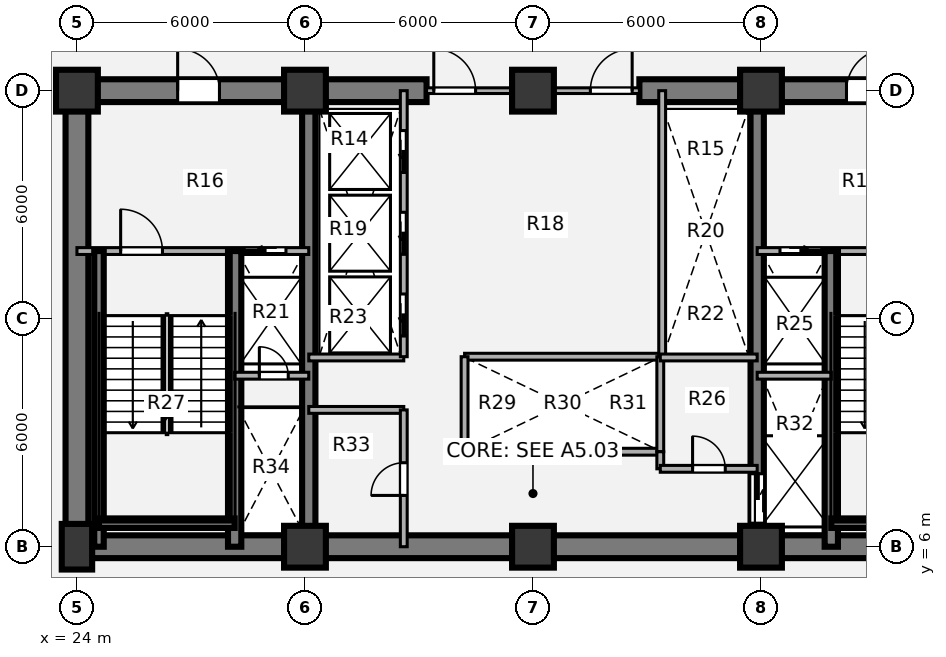
"""IFC4 building model, lengths in metres.
Left out: names, types, materials, properties, quantities, classifications, styles, units other than length and angle.
Written with IfcOpenShell. Run it as: python <this file> out.ifc"""

import sys

from ifc_helpers import new_model, si_unit, direction, frame, frame_2d, origin, origin_2d, place, context, subcontext, project, spatial, rectangle, extrude, source, transform, mapped, element, fill, save


model = new_model("IFC4")
c1 = context("Model", 3, precision=1e-05, world=origin(), true_north=direction((0.0, 1.0)))
c2 = subcontext(c1, "Body", "Model", "MODEL_VIEW")
j1 = project(units=[si_unit("LENGTHUNIT", "METRE"), si_unit("PLANEANGLEUNIT", "RADIAN")], contexts=[c1])
p1 = place(None, origin())
s1 = spatial("IfcSite", under=j1, at=p1, CompositionType="ELEMENT")
p2 = place(p1, origin())
s2 = spatial("IfcBuilding", under=s1, at=p2, CompositionType="ELEMENT")
p3 = place(p2, frame((0.0, 0.0, 9.72)))
s3 = spatial("IfcBuildingStorey", under=s2, at=p3, CompositionType="ELEMENT", Elevation=9.72)
m1 = source(origin(), c2, "Body", "SweptSolid", [
    extrude(rectangle(XDim=0.8, YDim=1.2, at=origin_2d()), origin(), (0.0, 0.0, 1.0), 4.32),
])
p4 = place(p3, frame((24.0, 6.0, 0.0), z_axis=(0.0, 0.0, 1.0), x_axis=(1.0, 0.0, 0.0)))
e1 = element("IfcColumn", 1, at=p4, inside=s3, PredefinedType="COLUMN", context=c2, shape_type="MappedRepresentation", body=[
    mapped(m1, transform((0.0, 0.0, 0.0), x_axis=(1.0, 0.0, 0.0), y_axis=(0.0, 1.0, 0.0), z_axis=(0.0, 0.0, 1.0), scale=1.0)),
])
m2 = source(origin(), c2, "Body", "SweptSolid", [
    extrude(rectangle(XDim=1.1, YDim=1.1, at=origin_2d()), origin(), (0.0, 0.0, 1.0), 4.32),
])
for number, where, z_axis, x_axis in (
    (2, (30.0, 6.0, 0.0), (0.0, 0.0, 1.0), (1.0, 0.0, 0.0)),
    (3, (36.0, 6.0, 0.0), (0.0, 0.0, 1.0), (1.0, 0.0, 0.0)),
    (4, (42.0, 6.0, 0.0), (0.0, 0.0, 1.0), (1.0, 0.0, 0.0)),
    (5, (24.0, 18.0, 0.0), (0.0, 0.0, 1.0), (1.0, 0.0, 0.0)),
    (6, (30.0, 18.0, 0.0), (0.0, 0.0, 1.0), (1.0, 0.0, 0.0)),
    (7, (36.0, 18.0, 0.0), (0.0, 0.0, 1.0), (1.0, 0.0, 0.0)),
    (8, (42.0, 18.0, 0.0), (0.0, 0.0, 1.0), (1.0, 0.0, 0.0)),
):
    element("IfcColumn", number, at=place(p3, frame(where, z_axis=z_axis, x_axis=x_axis)), inside=s3, PredefinedType="COLUMN", context=c2, shape_type="MappedRepresentation", body=[
        mapped(m2, transform((0.0, 0.0, 0.0), x_axis=(1.0, 0.0, 0.0), y_axis=(0.0, 1.0, 0.0), z_axis=(0.0, 0.0, 1.0), scale=1.0)),
    ])
p5 = place(p3, frame((48.3, 6.0, 0.0), z_axis=(0.0, 0.0, 1.0), x_axis=(-1.0, 0.0, 0.0)))
e9 = element("IfcWall", 9, at=p5, inside=s3, PredefinedType="SHEAR", context=c2, shape_type="SweptSolid", body=[
    extrude(rectangle(XDim=24.6, YDim=0.6, at=frame_2d((12.3, 0.0))), origin(), (0.0, 0.0, 1.0), 4.32),
])
p6 = place(p3, frame((24.0, 6.0, 0.0), z_axis=(0.0, 0.0, 1.0), x_axis=(0.0, 1.0, 0.0)))
e10 = element("IfcWall", 10, at=p6, inside=s3, PredefinedType="SHEAR", context=c2, shape_type="SweptSolid", body=[
    extrude(rectangle(XDim=12.0, YDim=0.6, at=frame_2d((6.0, 0.0))), origin(), (0.0, 0.0, 1.0), 4.32),
])
p7 = place(p3, frame((23.7, 18.0, 0.0), z_axis=(0.0, 0.0, 1.0), x_axis=(1.0, 0.0, 0.0)))
e11 = element("IfcWall", 11, at=p7, inside=s3, PredefinedType="SHEAR", context=c2, shape_type="SweptSolid", body=[
    extrude(rectangle(XDim=9.5, YDim=0.6, at=frame_2d((4.75, 0.0))), origin(), (0.0, 0.0, 1.0), 4.32),
])
p8 = place(p7, frame((2.95, 0.0, 0.0)))
e12 = element("IfcOpeningElement", 12, at=p8, cuts=e11, PredefinedType="OPENING", context=c2, shape_type="SweptSolid", body=[
    extrude(rectangle(XDim=1.1, YDim=2.1, at=origin_2d()), frame((0.55, 0.31, 1.05), z_axis=(0.0, -1.0, 0.0), x_axis=(1.0, 0.0, 0.0)), (0.0, 0.0, 1.0), 0.62),
])
p9 = place(p3, frame((38.8, 18.0, 0.0), z_axis=(0.0, 0.0, 1.0), x_axis=(1.0, 0.0, 0.0)))
e13 = element("IfcWall", 13, at=p9, inside=s3, PredefinedType="SHEAR", context=c2, shape_type="SweptSolid", body=[
    extrude(rectangle(XDim=9.5, YDim=0.6, at=frame_2d((4.75, 0.0))), origin(), (0.0, 0.0, 1.0), 4.32),
])
p10 = place(p9, frame((5.45, 0.0, 0.0)))
e14 = element("IfcOpeningElement", 14, at=p10, cuts=e13, PredefinedType="OPENING", context=c2, shape_type="SweptSolid", body=[
    extrude(rectangle(XDim=1.1, YDim=2.1, at=origin_2d()), frame((0.55, 0.31, 1.05), z_axis=(0.0, -1.0, 0.0), x_axis=(1.0, 0.0, 0.0)), (0.0, 0.0, 1.0), 0.62),
])
p11 = place(p3, frame((30.1, 6.0, 0.0), z_axis=(0.0, 0.0, 1.0), x_axis=(0.0, 1.0, 0.0)))
e15 = element("IfcWall", 15, at=p11, inside=s3, PredefinedType="SHEAR", context=c2, shape_type="SweptSolid", body=[
    extrude(rectangle(XDim=12.0, YDim=0.35, at=frame_2d((6.0, 0.0))), origin(), (0.0, 0.0, 1.0), 4.32),
])
p12 = place(p3, frame((41.9, 18.0, 0.0), z_axis=(0.0, 0.0, 1.0), x_axis=(0.0, -1.0, 0.0)))
e16 = element("IfcWall", 16, at=p12, inside=s3, PredefinedType="SHEAR", context=c2, shape_type="SweptSolid", body=[
    extrude(rectangle(XDim=12.0, YDim=0.35, at=frame_2d((6.0, 0.0))), origin(), (0.0, 0.0, 1.0), 4.32),
])
p13 = place(p12, frame((10.08, 0.0, 0.0)))
e17 = element("IfcOpeningElement", 17, at=p13, cuts=e16, PredefinedType="OPENING", context=c2, shape_type="SweptSolid", body=[
    extrude(rectangle(XDim=1.3, YDim=2.1, at=origin_2d()), frame((0.65, 0.185, 1.05), z_axis=(0.0, -1.0, 0.0), x_axis=(1.0, 0.0, 0.0)), (0.0, 0.0, 1.0), 0.37),
])
for number, where, z_axis, x_axis in (
    (18, (34.2, 11.0, 0.0), (0.0, 0.0, 1.0), (1.0, 0.0, 0.0)),
    (19, (34.2, 8.5, 0.0), (0.0, 0.0, 1.0), (1.0, 0.0, 0.0)),
):
    element("IfcWall", number, at=place(p3, frame(where, z_axis=z_axis, x_axis=x_axis)), inside=s3, PredefinedType="PARTITIONING", context=c2, shape_type="SweptSolid", body=[
        extrude(rectangle(XDim=5.15, YDim=0.18, at=frame_2d((2.575, 0.0))), origin(), (0.0, 0.0, 1.0), 4.01),
    ])
for number, where, z_axis, x_axis in (
    (20, (34.2, 8.5, 0.0), (0.0, 0.0, 1.0), (0.0, 1.0, 0.0)),
    (21, (39.35, 8.5, 0.0), (0.0, 0.0, 1.0), (0.0, 1.0, 0.0)),
):
    element("IfcWall", number, at=place(p3, frame(where, z_axis=z_axis, x_axis=x_axis)), inside=s3, PredefinedType="PARTITIONING", context=c2, shape_type="SweptSolid", body=[
        extrude(rectangle(XDim=2.5, YDim=0.18, at=frame_2d((1.25, 0.0))), origin(), (0.0, 0.0, 1.0), 4.01),
    ])
p14 = place(p3, frame((39.4, 11.0, 0.0), z_axis=(0.0, 0.0, 1.0), x_axis=(0.0, 1.0, 0.0)))
e22 = element("IfcWall", 22, at=p14, inside=s3, PredefinedType="PARTITIONING", context=c2, shape_type="SweptSolid", body=[
    extrude(rectangle(XDim=7.0, YDim=0.18, at=frame_2d((3.5, 0.0))), origin(), (0.0, 0.0, 1.0), 4.01),
])
for number, where, z_axis, x_axis in (
    (23, (30.1, 10.98, 0.0), (0.0, 0.0, 1.0), (1.0, 0.0, 0.0)),
    (24, (30.1, 9.6, 0.0), (0.0, 0.0, 1.0), (1.0, 0.0, 0.0)),
):
    element("IfcWall", number, at=place(p3, frame(where, z_axis=z_axis, x_axis=x_axis)), inside=s3, PredefinedType="PARTITIONING", context=c2, shape_type="SweptSolid", body=[
        extrude(rectangle(XDim=2.5, YDim=0.18, at=frame_2d((1.25, 0.0))), origin(), (0.0, 0.0, 1.0), 4.01),
    ])
p15 = place(p3, frame((32.6, 6.0, 0.0), z_axis=(0.0, 0.0, 1.0), x_axis=(0.0, 1.0, 0.0)))
e25 = element("IfcWall", 25, at=p15, inside=s3, PredefinedType="PARTITIONING", context=c2, shape_type="SweptSolid", body=[
    extrude(rectangle(XDim=3.6, YDim=0.18, at=frame_2d((1.8, 0.0))), origin(), (0.0, 0.0, 1.0), 4.01),
])
p16 = place(p15, frame((1.35, 0.0, 0.0)))
e26 = element("IfcOpeningElement", 26, at=p16, cuts=e25, PredefinedType="OPENING", context=c2, shape_type="SweptSolid", body=[
    extrude(rectangle(XDim=0.86, YDim=2.1, at=origin_2d()), frame((0.43, 0.1, 1.05), z_axis=(0.0, -1.0, 0.0), x_axis=(1.0, 0.0, 0.0)), (0.0, 0.0, 1.0), 0.2),
])
p17 = place(p3, frame((39.35, 10.98, 0.0), z_axis=(0.0, 0.0, 1.0), x_axis=(1.0, 0.0, 0.0)))
e27 = element("IfcWall", 27, at=p17, inside=s3, PredefinedType="PARTITIONING", context=c2, shape_type="SweptSolid", body=[
    extrude(rectangle(XDim=2.55, YDim=0.18, at=frame_2d((1.275, 0.0))), origin(), (0.0, 0.0, 1.0), 4.01),
])
p18 = place(p3, frame((39.35, 8.05, 0.0), z_axis=(0.0, 0.0, 1.0), x_axis=(0.0, 1.0, 0.0)))
e28 = element("IfcWall", 28, at=p18, inside=s3, PredefinedType="PARTITIONING", context=c2, shape_type="SweptSolid", body=[
    extrude(rectangle(XDim=0.45, YDim=0.18, at=frame_2d((0.225, 0.0))), origin(), (0.0, 0.0, 1.0), 4.01),
])
p19 = place(p3, frame((39.35, 8.05, 0.0), z_axis=(0.0, 0.0, 1.0), x_axis=(1.0, 0.0, 0.0)))
e29 = element("IfcWall", 29, at=p19, inside=s3, PredefinedType="PARTITIONING", context=c2, shape_type="SweptSolid", body=[
    extrude(rectangle(XDim=2.55, YDim=0.18, at=frame_2d((1.275, 0.0))), origin(), (0.0, 0.0, 1.0), 4.01),
])
p20 = place(p19, frame((0.85, 0.0, 0.0)))
e30 = element("IfcOpeningElement", 30, at=p20, cuts=e29, PredefinedType="OPENING", context=c2, shape_type="SweptSolid", body=[
    extrude(rectangle(XDim=0.86, YDim=2.1, at=origin_2d()), frame((0.43, 0.1, 1.05), z_axis=(0.0, -1.0, 0.0), x_axis=(1.0, 0.0, 0.0)), (0.0, 0.0, 1.0), 0.2),
])
p21 = place(p3, frame((33.2, 18.0, 0.0), z_axis=(0.0, 0.0, 1.0), x_axis=(1.0, 0.0, 0.0)))
e31 = element("IfcWall", 31, at=p21, inside=s3, PredefinedType="PARTITIONING", context=c2, shape_type="SweptSolid", body=[
    extrude(rectangle(XDim=5.6, YDim=0.15, at=frame_2d((2.8, 0.0))), origin(), (0.0, 0.0, 1.0), 2.825),
])
p22 = place(p21, frame((0.19, 0.0, 0.0)))
e32 = element("IfcOpeningElement", 32, at=p22, cuts=e31, PredefinedType="OPENING", context=c2, shape_type="SweptSolid", body=[
    extrude(rectangle(XDim=1.1, YDim=2.1, at=origin_2d()), frame((0.55, 0.085, 1.05), z_axis=(0.0, -1.0, 0.0), x_axis=(1.0, 0.0, 0.0)), (0.0, 0.0, 1.0), 0.17),
])
p23 = place(p21, frame((4.31, 0.0, 0.0)))
e33 = element("IfcOpeningElement", 33, at=p23, cuts=e31, PredefinedType="OPENING", context=c2, shape_type="SweptSolid", body=[
    extrude(rectangle(XDim=1.1, YDim=2.1, at=origin_2d()), frame((0.55, 0.085, 1.05), z_axis=(0.0, -1.0, 0.0), x_axis=(1.0, 0.0, 0.0)), (0.0, 0.0, 1.0), 0.17),
])
p24 = place(p3, frame((24.0, 13.78, 0.0), z_axis=(0.0, 0.0, 1.0), x_axis=(1.0, 0.0, 0.0)))
e34 = element("IfcWall", 34, at=p24, inside=s3, PredefinedType="PARTITIONING", context=c2, shape_type="SweptSolid", body=[
    extrude(rectangle(XDim=6.1, YDim=0.18, at=frame_2d((3.05, 0.0))), origin(), (0.0, 0.0, 1.0), 4.01),
])
p25 = place(p24, frame((1.15, 0.0, 0.0)))
e35 = element("IfcOpeningElement", 35, at=p25, cuts=e34, PredefinedType="OPENING", context=c2, shape_type="SweptSolid", body=[
    extrude(rectangle(XDim=1.1, YDim=2.1, at=origin_2d()), frame((0.55, 0.1, 1.05), z_axis=(0.0, -1.0, 0.0), x_axis=(1.0, 0.0, 0.0)), (0.0, 0.0, 1.0), 0.2),
])
p26 = place(p24, frame((4.4, 0.0, 0.0)))
e36 = element("IfcOpeningElement", 36, at=p26, cuts=e34, PredefinedType="OPENING", context=c2, shape_type="SweptSolid", body=[
    extrude(rectangle(XDim=1.1, YDim=2.1, at=origin_2d()), frame((0.55, 0.1, 1.05), z_axis=(0.0, -1.0, 0.0), x_axis=(1.0, 0.0, 0.0)), (0.0, 0.0, 1.0), 0.2),
])
p27 = place(p3, frame((28.15, 6.0, 0.0), z_axis=(0.0, 0.0, 1.0), x_axis=(0.0, 1.0, 0.0)))
e37 = element("IfcWall", 37, at=p27, inside=s3, PredefinedType="SHEAR", context=c2, shape_type="SweptSolid", body=[
    extrude(rectangle(XDim=7.78, YDim=0.35, at=frame_2d((3.89, 0.0))), origin(), (0.0, 0.0, 1.0), 4.36),
])
p28 = place(p3, frame((24.58, 6.0, 0.0), z_axis=(0.0, 0.0, 1.0), x_axis=(0.0, 1.0, 0.0)))
e38 = element("IfcWall", 38, at=p28, inside=s3, PredefinedType="SHEAR", context=c2, shape_type="SweptSolid", body=[
    extrude(rectangle(XDim=7.78, YDim=0.25, at=frame_2d((3.89, 0.0))), origin(), (0.0, 0.0, 1.0), 4.36),
])
p29 = place(p3, frame((24.58, 6.62, 0.0), z_axis=(0.0, 0.0, 1.0), x_axis=(1.0, 0.0, 0.0)))
e39 = element("IfcWall", 39, at=p29, inside=s3, PredefinedType="SHEAR", context=c2, shape_type="SweptSolid", body=[
    extrude(rectangle(XDim=3.57, YDim=0.25, at=frame_2d((1.785, 0.0))), origin(), (0.0, 0.0, 1.0), 4.36),
])
p30 = place(p3, frame((28.15, 10.5, 0.0), z_axis=(0.0, 0.0, 1.0), x_axis=(1.0, 0.0, 0.0)))
e40 = element("IfcWall", 40, at=p30, inside=s3, PredefinedType="PARTITIONING", context=c2, shape_type="SweptSolid", body=[
    extrude(rectangle(XDim=1.95, YDim=0.18, at=frame_2d((0.975, 0.0))), origin(), (0.0, 0.0, 1.0), 4.01),
])
p31 = place(p30, frame((0.65, 0.0, 0.0)))
e41 = element("IfcOpeningElement", 41, at=p31, cuts=e40, PredefinedType="OPENING", context=c2, shape_type="SweptSolid", body=[
    extrude(rectangle(XDim=0.76, YDim=2.05, at=origin_2d()), frame((0.38, 0.1, 1.025), z_axis=(0.0, -1.0, 0.0), x_axis=(1.0, 0.0, 0.0)), (0.0, 0.0, 1.0), 0.2),
])
p32 = place(p3, frame((41.9, 13.78, 0.0), z_axis=(0.0, 0.0, 1.0), x_axis=(1.0, 0.0, 0.0)))
e42 = element("IfcWall", 42, at=p32, inside=s3, PredefinedType="PARTITIONING", context=c2, shape_type="SweptSolid", body=[
    extrude(rectangle(XDim=6.1, YDim=0.18, at=frame_2d((3.05, 0.0))), origin(), (0.0, 0.0, 1.0), 4.01),
])
p33 = place(p32, frame((0.6, 0.0, 0.0)))
e43 = element("IfcOpeningElement", 43, at=p33, cuts=e42, PredefinedType="OPENING", context=c2, shape_type="SweptSolid", body=[
    extrude(rectangle(XDim=1.1, YDim=2.1, at=origin_2d()), frame((0.55, 0.1, 1.05), z_axis=(0.0, -1.0, 0.0), x_axis=(1.0, 0.0, 0.0)), (0.0, 0.0, 1.0), 0.2),
])
p34 = place(p32, frame((3.8, 0.0, 0.0)))
e44 = element("IfcOpeningElement", 44, at=p34, cuts=e42, PredefinedType="OPENING", context=c2, shape_type="SweptSolid", body=[
    extrude(rectangle(XDim=1.1, YDim=2.1, at=origin_2d()), frame((0.55, 0.1, 1.05), z_axis=(0.0, -1.0, 0.0), x_axis=(1.0, 0.0, 0.0)), (0.0, 0.0, 1.0), 0.2),
])
p35 = place(p3, frame((43.85, 6.0, 0.0), z_axis=(0.0, 0.0, 1.0), x_axis=(0.0, 1.0, 0.0)))
e45 = element("IfcWall", 45, at=p35, inside=s3, PredefinedType="SHEAR", context=c2, shape_type="SweptSolid", body=[
    extrude(rectangle(XDim=7.78, YDim=0.35, at=frame_2d((3.89, 0.0))), origin(), (0.0, 0.0, 1.0), 4.36),
])
p36 = place(p3, frame((43.85, 6.62, 0.0), z_axis=(0.0, 0.0, 1.0), x_axis=(1.0, 0.0, 0.0)))
e46 = element("IfcWall", 46, at=p36, inside=s3, PredefinedType="SHEAR", context=c2, shape_type="SweptSolid", body=[
    extrude(rectangle(XDim=3.57, YDim=0.25, at=frame_2d((1.785, 0.0))), origin(), (0.0, 0.0, 1.0), 4.36),
])
p37 = place(p3, frame((41.9, 10.5, 0.0), z_axis=(0.0, 0.0, 1.0), x_axis=(1.0, 0.0, 0.0)))
e47 = element("IfcWall", 47, at=p37, inside=s3, PredefinedType="PARTITIONING", context=c2, shape_type="SweptSolid", body=[
    extrude(rectangle(XDim=1.95, YDim=0.18, at=frame_2d((0.975, 0.0))), origin(), (0.0, 0.0, 1.0), 4.01),
])
p38 = place(p3, frame((32.6, 11.0, 0.0), z_axis=(0.0, 0.0, 1.0), x_axis=(0.0, 1.0, 0.0)))
e48 = element("IfcWall", 48, at=p38, inside=s3, PredefinedType="PARTITIONING", context=c2, shape_type="SweptSolid", body=[
    extrude(rectangle(XDim=7.0, YDim=0.18, at=frame_2d((3.5, 0.0))), origin(), (0.0, 0.0, 1.0), 4.01),
])
p39 = place(p38, frame((0.55, 0.0, 0.0)))
e49 = element("IfcOpeningElement", 49, at=p39, cuts=e48, PredefinedType="OPENING", context=c2, shape_type="SweptSolid", body=[
    extrude(rectangle(XDim=1.1, YDim=2.1, at=origin_2d()), frame((0.55, 0.1, 1.05), z_axis=(0.0, -1.0, 0.0), x_axis=(1.0, 0.0, 0.0)), (0.0, 0.0, 1.0), 0.2),
])
p40 = place(p38, frame((2.7, 0.0, 0.0)))
e50 = element("IfcOpeningElement", 50, at=p40, cuts=e48, PredefinedType="OPENING", context=c2, shape_type="SweptSolid", body=[
    extrude(rectangle(XDim=1.1, YDim=2.1, at=origin_2d()), frame((0.55, 0.1, 1.05), z_axis=(0.0, -1.0, 0.0), x_axis=(1.0, 0.0, 0.0)), (0.0, 0.0, 1.0), 0.2),
])
p41 = place(p38, frame((4.85, 0.0, 0.0)))
e51 = element("IfcOpeningElement", 51, at=p41, cuts=e48, PredefinedType="OPENING", context=c2, shape_type="SweptSolid", body=[
    extrude(rectangle(XDim=1.1, YDim=2.1, at=origin_2d()), frame((0.55, 0.1, 1.05), z_axis=(0.0, -1.0, 0.0), x_axis=(1.0, 0.0, 0.0)), (0.0, 0.0, 1.0), 0.2),
])
m3 = source(origin(), c2, "Body", "SweptSolid", [
    extrude(rectangle(XDim=0.86, YDim=2.1, at=origin_2d()), frame((0.43, 0.025, 1.05), z_axis=(0.0, -1.0, 0.0), x_axis=(1.0, 0.0, 0.0)), (0.0, 0.0, 1.0), 0.05),
])
p42 = place(p16, origin())
e52 = element("IfcDoor", 52, at=p42, inside=s3, OperationType="SINGLE_SWING_LEFT", PredefinedType="DOOR", context=c2, shape_type="MappedRepresentation", body=[
    mapped(m3, transform((0.0, 0.0, 0.0), x_axis=(1.0, 0.0, 0.0), y_axis=(0.0, 1.0, 0.0), z_axis=(0.0, 0.0, 1.0), scale=1.0)),
])
fill(e26, e52)
p43 = place(p20, origin())
e53 = element("IfcDoor", 53, at=p43, inside=s3, OperationType="SINGLE_SWING_LEFT", PredefinedType="DOOR", context=c2, shape_type="MappedRepresentation", body=[
    mapped(m3, transform((0.0, 0.0, 0.0), x_axis=(1.0, 0.0, 0.0), y_axis=(0.0, 1.0, 0.0), z_axis=(0.0, 0.0, 1.0), scale=1.0)),
])
fill(e30, e53)
m4 = source(origin(), c2, "Body", "SweptSolid", [
    extrude(rectangle(XDim=1.1, YDim=2.1, at=origin_2d()), frame((0.55, 0.025, 1.05), z_axis=(0.0, -1.0, 0.0), x_axis=(1.0, 0.0, 0.0)), (0.0, 0.0, 1.0), 0.05),
])
p44 = place(p22, origin())
e54 = element("IfcDoor", 54, at=p44, inside=s3, OperationType="SINGLE_SWING_LEFT", PredefinedType="DOOR", context=c2, shape_type="MappedRepresentation", body=[
    mapped(m4, transform((0.0, 0.0, 0.0), x_axis=(1.0, 0.0, 0.0), y_axis=(0.0, 1.0, 0.0), z_axis=(0.0, 0.0, 1.0), scale=1.0)),
])
fill(e32, e54)
p45 = place(p23, origin())
e55 = element("IfcDoor", 55, at=p45, inside=s3, OperationType="SINGLE_SWING_RIGHT", PredefinedType="DOOR", context=c2, shape_type="MappedRepresentation", body=[
    mapped(m4, transform((0.0, 0.0, 0.0), x_axis=(1.0, 0.0, 0.0), y_axis=(0.0, 1.0, 0.0), z_axis=(0.0, 0.0, 1.0), scale=1.0)),
])
fill(e33, e55)
m5 = source(origin(), c2, "Body", "SweptSolid", [
    extrude(rectangle(XDim=1.1, YDim=2.1, at=origin_2d()), frame((0.55, 0.025, 1.05), z_axis=(0.0, -1.0, 0.0), x_axis=(1.0, 0.0, 0.0)), (0.0, 0.0, 1.0), 0.05),
])
p46 = place(p25, origin())
e56 = element("IfcDoor", 56, at=p46, inside=s3, OperationType="SINGLE_SWING_LEFT", PredefinedType="DOOR", context=c2, shape_type="MappedRepresentation", body=[
    mapped(m5, transform((0.0, 0.0, 0.0), x_axis=(1.0, 0.0, 0.0), y_axis=(0.0, 1.0, 0.0), z_axis=(0.0, 0.0, 1.0), scale=1.0)),
])
fill(e35, e56)
m6 = source(origin(), c2, "Body", "SweptSolid", [
    extrude(rectangle(XDim=1.1, YDim=2.1, at=origin_2d()), frame((0.55, 0.025, 1.05), z_axis=(0.0, -1.0, 0.0), x_axis=(1.0, 0.0, 0.0)), (0.0, 0.0, 1.0), 0.05),
])
p47 = place(p26, origin())
e57 = element("IfcDoor", 57, at=p47, inside=s3, OperationType="SLIDING_TO_LEFT", PredefinedType="DOOR", context=c2, shape_type="MappedRepresentation", body=[
    mapped(m6, transform((0.0, 0.0, 0.0), x_axis=(1.0, 0.0, 0.0), y_axis=(0.0, 1.0, 0.0), z_axis=(0.0, 0.0, 1.0), scale=1.0)),
])
fill(e36, e57)
m7 = source(origin(), c2, "Body", "SweptSolid", [
    extrude(rectangle(XDim=0.76, YDim=2.05, at=origin_2d()), frame((0.38, 0.025, 1.025), z_axis=(0.0, -1.0, 0.0), x_axis=(1.0, 0.0, 0.0)), (0.0, 0.0, 1.0), 0.05),
])
p48 = place(p31, origin())
e58 = element("IfcDoor", 58, at=p48, inside=s3, OperationType="SINGLE_SWING_LEFT", PredefinedType="DOOR", context=c2, shape_type="MappedRepresentation", body=[
    mapped(m7, transform((0.0, 0.0, 0.0), x_axis=(1.0, 0.0, 0.0), y_axis=(0.0, 1.0, 0.0), z_axis=(0.0, 0.0, 1.0), scale=1.0)),
])
fill(e41, e58)
p49 = place(p33, origin())
e59 = element("IfcDoor", 59, at=p49, inside=s3, OperationType="SLIDING_TO_RIGHT", PredefinedType="DOOR", context=c2, shape_type="MappedRepresentation", body=[
    mapped(m6, transform((0.0, 0.0, 0.0), x_axis=(1.0, 0.0, 0.0), y_axis=(0.0, 1.0, 0.0), z_axis=(0.0, 0.0, 1.0), scale=1.0)),
])
fill(e43, e59)
m8 = source(origin(), c2, "Body", "SweptSolid", [
    extrude(rectangle(XDim=1.3, YDim=2.1, at=origin_2d()), frame((0.65, 0.025, 1.05), z_axis=(0.0, -1.0, 0.0), x_axis=(1.0, 0.0, 0.0)), (0.0, 0.0, 1.0), 0.05),
])
p50 = place(p13, origin())
e60 = element("IfcDoor", 60, at=p50, inside=s3, OperationType="SLIDING_TO_LEFT", PredefinedType="DOOR", context=c2, shape_type="MappedRepresentation", body=[
    mapped(m8, transform((0.0, 0.0, 0.0), x_axis=(1.0, 0.0, 0.0), y_axis=(0.0, 1.0, 0.0), z_axis=(0.0, 0.0, 1.0), scale=1.0)),
])
fill(e17, e60)
p51 = place(p8, origin())
e61 = element("IfcDoor", 61, at=p51, inside=s3, OperationType="SINGLE_SWING_LEFT", PredefinedType="DOOR", context=c2, shape_type="MappedRepresentation", body=[
    mapped(m4, transform((0.0, 0.0, 0.0), x_axis=(1.0, 0.0, 0.0), y_axis=(0.0, 1.0, 0.0), z_axis=(0.0, 0.0, 1.0), scale=1.0)),
])
fill(e12, e61)
p52 = place(p10, origin())
e62 = element("IfcDoor", 62, at=p52, inside=s3, OperationType="SINGLE_SWING_RIGHT", PredefinedType="DOOR", context=c2, shape_type="MappedRepresentation", body=[
    mapped(m4, transform((0.0, 0.0, 0.0), x_axis=(1.0, 0.0, 0.0), y_axis=(0.0, 1.0, 0.0), z_axis=(0.0, 0.0, 1.0), scale=1.0)),
])
fill(e14, e62)
p53 = place(p39, origin())
e63 = element("IfcDoor", 63, at=p53, inside=s3, OperationType="SLIDING_TO_LEFT", PredefinedType="DOOR", context=c2, shape_type="MappedRepresentation", body=[
    mapped(m6, transform((0.0, 0.0, 0.0), x_axis=(1.0, 0.0, 0.0), y_axis=(0.0, 1.0, 0.0), z_axis=(0.0, 0.0, 1.0), scale=1.0)),
])
fill(e49, e63)
p54 = place(p40, origin())
e64 = element("IfcDoor", 64, at=p54, inside=s3, OperationType="SLIDING_TO_LEFT", PredefinedType="DOOR", context=c2, shape_type="MappedRepresentation", body=[
    mapped(m6, transform((0.0, 0.0, 0.0), x_axis=(1.0, 0.0, 0.0), y_axis=(0.0, 1.0, 0.0), z_axis=(0.0, 0.0, 1.0), scale=1.0)),
])
fill(e50, e64)
p55 = place(p41, origin())
e65 = element("IfcDoor", 65, at=p55, inside=s3, OperationType="SLIDING_TO_LEFT", PredefinedType="DOOR", context=c2, shape_type="MappedRepresentation", body=[
    mapped(m6, transform((0.0, 0.0, 0.0), x_axis=(1.0, 0.0, 0.0), y_axis=(0.0, 1.0, 0.0), z_axis=(0.0, 0.0, 1.0), scale=1.0)),
])
fill(e51, e65)
save(model, sys.argv[1])
